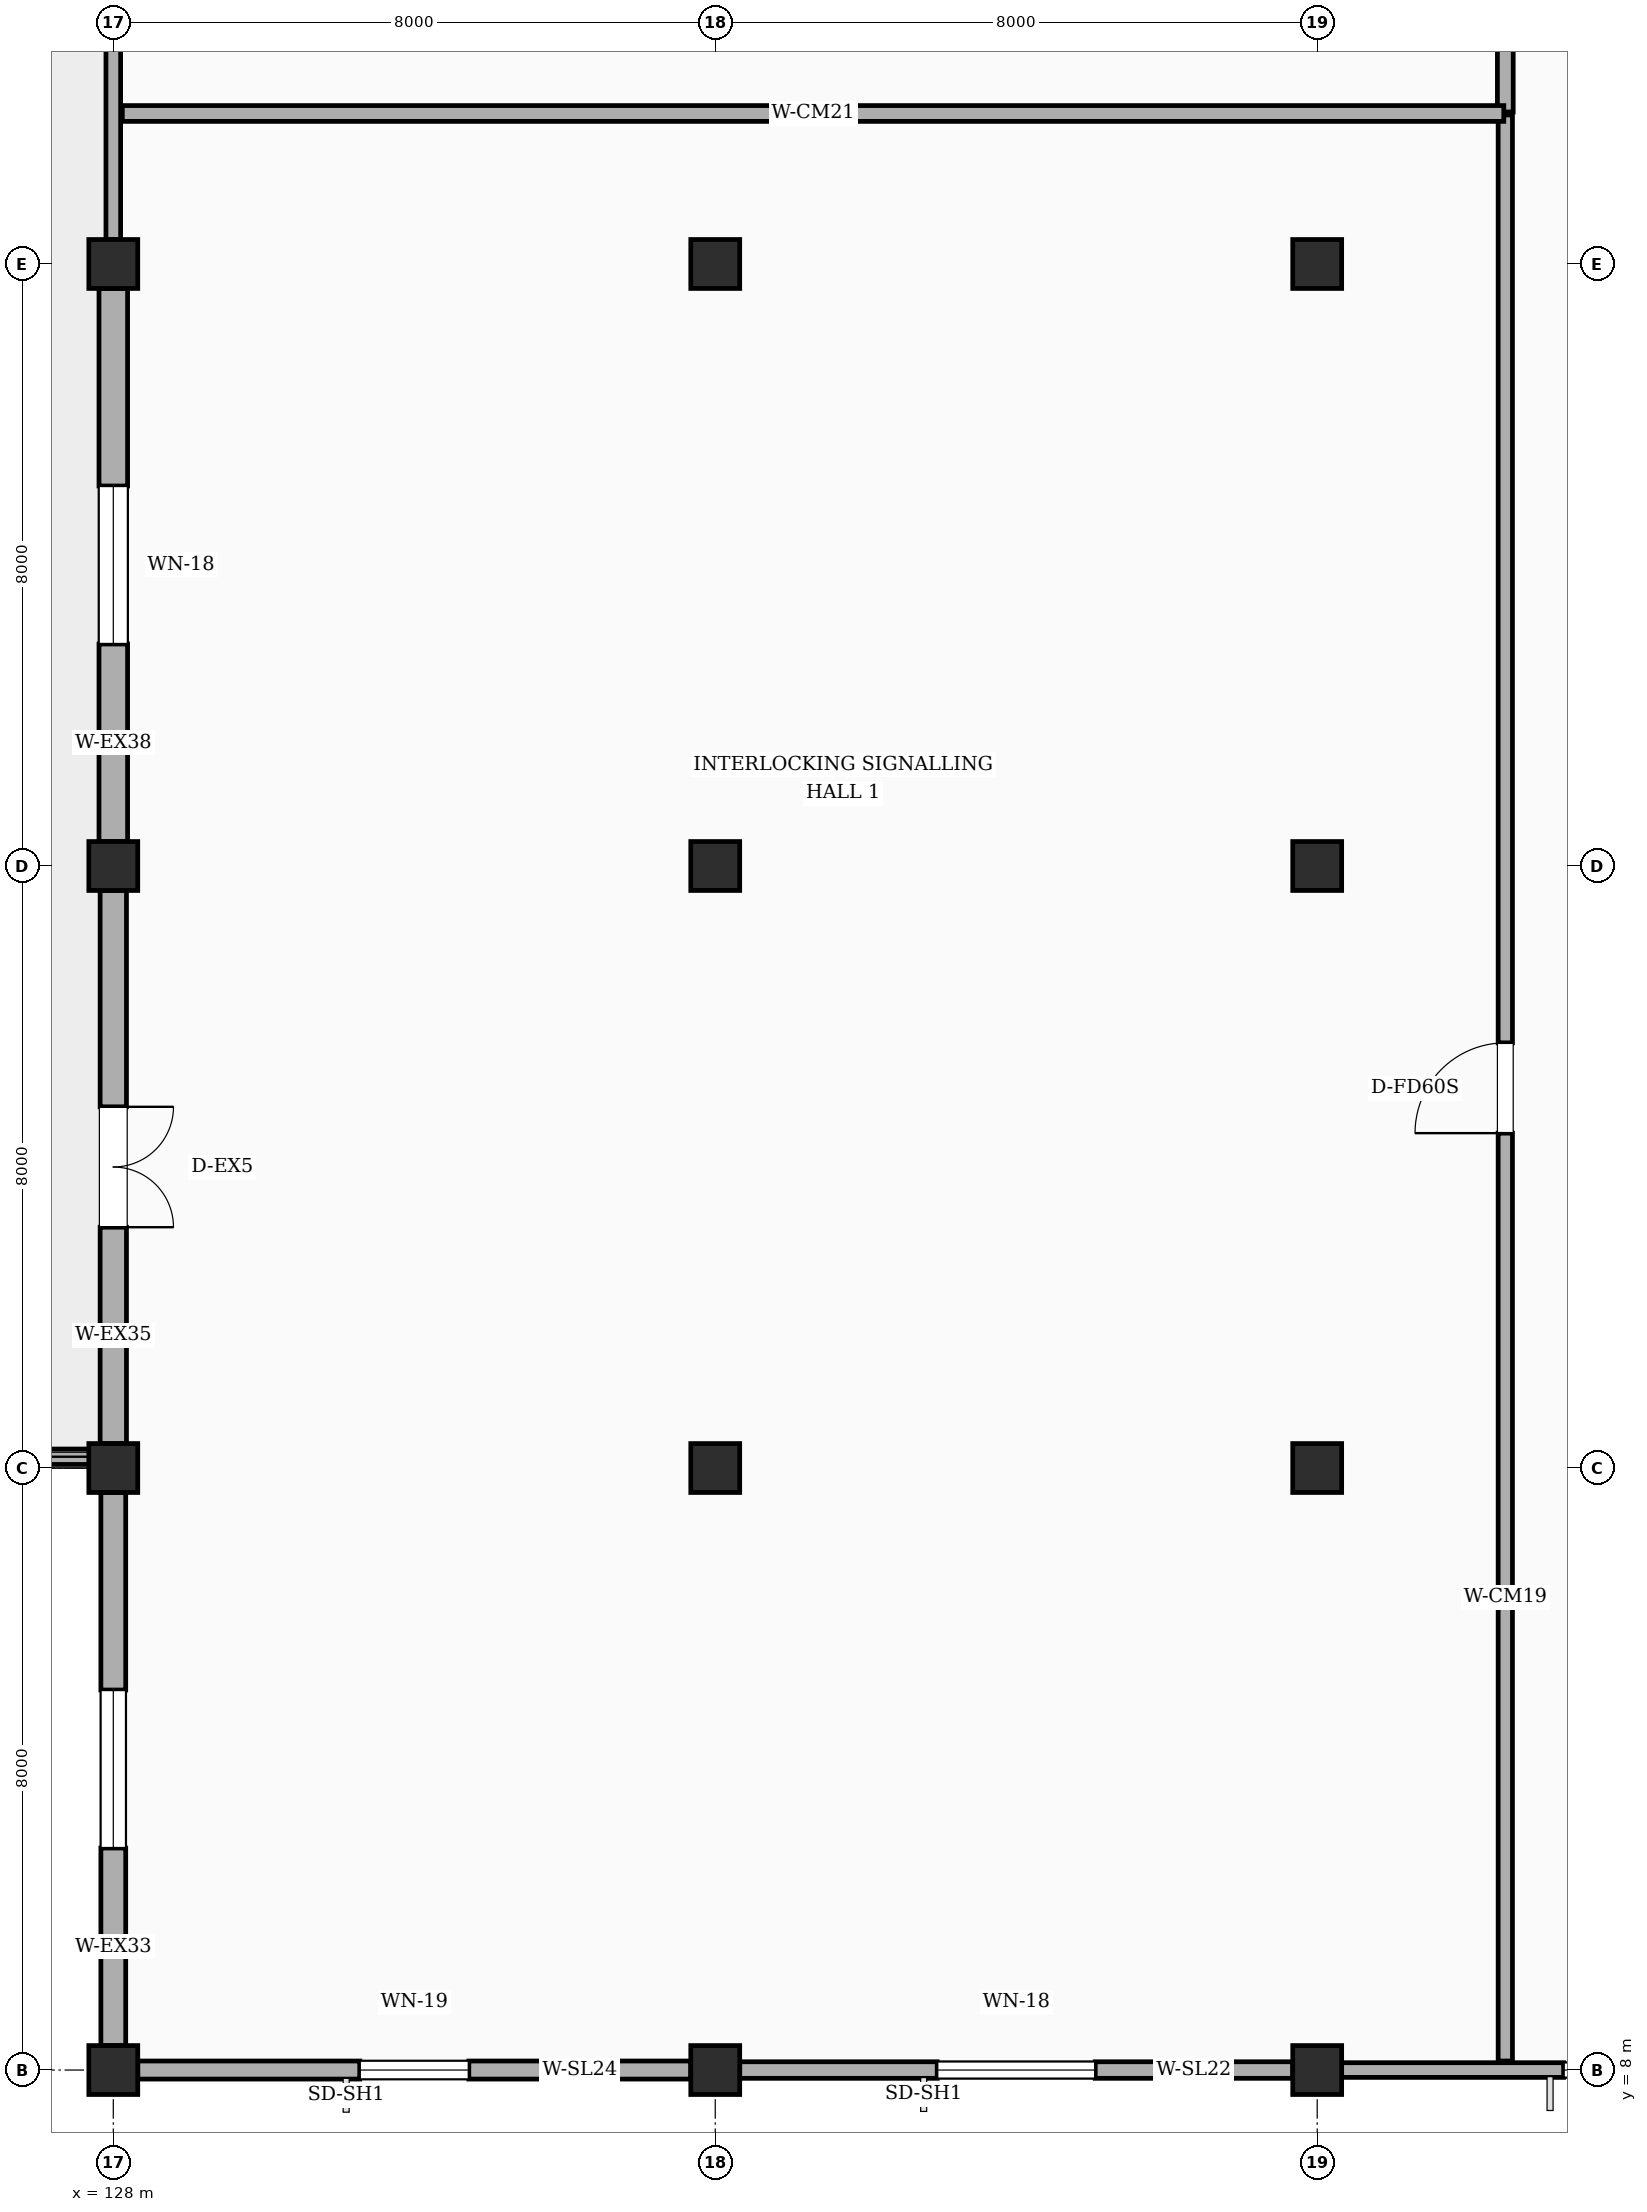
"""IFC4 building model, lengths in metres.
Left out: names, types, materials, properties, quantities, classifications, styles, units other than length and angle.
Written with IfcOpenShell. Run it as: python <this file> out.ifc"""

import sys

from ifc_helpers import new_model, si_unit, direction, frame, frame_2d, origin, origin_2d, place, context, subcontext, project, spatial, rectangle, extrude, element, fill, save


model = new_model("IFC4")
c1 = context("Model", 3, precision=1e-05, world=origin(), true_north=direction((0.0, 1.0)))
c2 = subcontext(c1, "Body", "Model", "MODEL_VIEW")
j1 = project(units=[si_unit("LENGTHUNIT", "METRE"), si_unit("PLANEANGLEUNIT", "RADIAN")], contexts=[c1])
p1 = place(None, origin())
s1 = spatial("IfcSite", under=j1, at=p1, CompositionType="ELEMENT")
p2 = place(p1, origin())
s2 = spatial("IfcBuilding", under=s1, at=p2, CompositionType="ELEMENT")
p3 = place(p2, frame((0.0, 0.0, 15.0)))
s3 = spatial("IfcBuildingStorey", under=s2, at=p3, CompositionType="ELEMENT", Elevation=15.0)
for number, where, z_axis, x_axis in (
    (1, (128.0, 8.0, 0.0), (0.0, 0.0, 1.0), (1.0, 0.0, 0.0)),
    (2, (128.0, 16.0, 0.0), (0.0, 0.0, 1.0), (1.0, 0.0, 0.0)),
    (3, (128.0, 24.0, 0.0), (0.0, 0.0, 1.0), (1.0, 0.0, 0.0)),
    (4, (128.0, 32.0, 0.0), (0.0, 0.0, 1.0), (1.0, 0.0, 0.0)),
    (5, (136.0, 8.0, 0.0), (0.0, 0.0, 1.0), (1.0, 0.0, 0.0)),
    (6, (136.0, 16.0, 0.0), (0.0, 0.0, 1.0), (1.0, 0.0, 0.0)),
    (7, (136.0, 24.0, 0.0), (0.0, 0.0, 1.0), (1.0, 0.0, 0.0)),
    (8, (136.0, 32.0, 0.0), (0.0, 0.0, 1.0), (1.0, 0.0, 0.0)),
    (9, (144.0, 8.0, 0.0), (0.0, 0.0, 1.0), (1.0, 0.0, 0.0)),
    (10, (144.0, 16.0, 0.0), (0.0, 0.0, 1.0), (1.0, 0.0, 0.0)),
    (11, (144.0, 24.0, 0.0), (0.0, 0.0, 1.0), (1.0, 0.0, 0.0)),
    (12, (144.0, 32.0, 0.0), (0.0, 0.0, 1.0), (1.0, 0.0, 0.0)),
):
    element("IfcColumn", number, at=place(p3, frame(where, z_axis=z_axis, x_axis=x_axis)), inside=s3, PredefinedType="COLUMN", context=c2, shape_type="SweptSolid", body=[
        extrude(rectangle(XDim=0.65, YDim=0.65, at=origin_2d()), origin(), (0.0, 0.0, 1.0), 4.2),
    ])
p4 = place(p3, frame((128.325, 8.0, 0.0), z_axis=(0.0, 0.0, 1.0), x_axis=(1.0, 0.0, 0.0)))
e13 = element("IfcWall", 13, at=p4, inside=s3, PredefinedType="SOLIDWALL", context=c2, shape_type="SweptSolid", body=[
    extrude(rectangle(XDim=7.35, YDim=0.24, at=frame_2d((3.675, 0.0))), origin(), (0.0, 0.0, 1.0), 3.442),
])
p5 = place(p4, frame((2.95, 0.0, 1.15)))
e14 = element("IfcOpeningElement", 14, at=p5, cuts=e13, PredefinedType="OPENING", context=c2, shape_type="SweptSolid", body=[
    extrude(rectangle(XDim=1.45, YDim=1.4, at=frame_2d((0.725, 0.7))), frame((0.0, 0.13, 0.0), z_axis=(0.0, -1.0, 0.0), x_axis=(1.0, 0.0, 0.0)), (0.0, 0.0, 1.0), 0.26),
])
p6 = place(p3, frame((136.325, 8.0, 0.0), z_axis=(0.0, 0.0, 1.0), x_axis=(1.0, 0.0, 0.0)))
e15 = element("IfcWall", 15, at=p6, inside=s3, PredefinedType="SOLIDWALL", context=c2, shape_type="SweptSolid", body=[
    extrude(rectangle(XDim=7.35, YDim=0.22, at=frame_2d((3.675, 0.0))), origin(), (0.0, 0.0, 1.0), 3.365),
])
p7 = place(p6, frame((2.625, 0.0, 1.15)))
e16 = element("IfcOpeningElement", 16, at=p7, cuts=e15, PredefinedType="OPENING", context=c2, shape_type="SweptSolid", body=[
    extrude(rectangle(XDim=2.1, YDim=1.4, at=frame_2d((1.05, 0.7))), frame((0.0, 0.12, 0.0), z_axis=(0.0, -1.0, 0.0), x_axis=(1.0, 0.0, 0.0)), (0.0, 0.0, 1.0), 0.24),
])
p8 = place(p3, frame((144.325, 8.0, 0.0), z_axis=(0.0, 0.0, 1.0), x_axis=(1.0, 0.0, 0.0)))
e17 = element("IfcWall", 17, at=p8, inside=s3, PredefinedType="SOLIDWALL", context=c2, shape_type="SweptSolid", body=[
    extrude(rectangle(XDim=7.35, YDim=0.195, at=frame_2d((3.675, 0.0))), origin(), (0.0, 0.0, 1.0), 3.95),
])
p9 = place(p8, frame((2.95, 0.0, 1.15)))
e18 = element("IfcOpeningElement", 18, at=p9, cuts=e17, PredefinedType="OPENING", context=c2, shape_type="SweptSolid", body=[
    extrude(rectangle(XDim=1.45, YDim=1.4, at=frame_2d((0.725, 0.7))), frame((0.0, 0.107, 0.0), z_axis=(0.0, -1.0, 0.0), x_axis=(1.0, 0.0, 0.0)), (0.0, 0.0, 1.0), 0.215),
])
p10 = place(p3, frame((128.0, 39.675, 0.0), z_axis=(0.0, 0.0, 1.0), x_axis=(0.0, -1.0, 0.0)))
e19 = element("IfcWall", 19, at=p10, inside=s3, PredefinedType="SOLIDWALL", context=c2, shape_type="SweptSolid", body=[
    extrude(rectangle(XDim=7.35, YDim=0.195, at=frame_2d((3.675, 0.0))), origin(), (0.0, 0.0, 1.0), 3.36),
])
p11 = place(p10, frame((2.95, 0.0, 1.15)))
e20 = element("IfcOpeningElement", 20, at=p11, cuts=e19, PredefinedType="OPENING", context=c2, shape_type="SweptSolid", body=[
    extrude(rectangle(XDim=1.45, YDim=1.4, at=frame_2d((0.725, 0.7))), frame((0.0, 0.107, 0.0), z_axis=(0.0, -1.0, 0.0), x_axis=(1.0, 0.0, 0.0)), (0.0, 0.0, 1.0), 0.215),
])
p12 = place(p3, frame((128.0, 31.675, 0.0), z_axis=(0.0, 0.0, 1.0), x_axis=(0.0, -1.0, 0.0)))
e21 = element("IfcWall", 21, at=p12, inside=s3, PredefinedType="STANDARD", context=c2, shape_type="SweptSolid", body=[
    extrude(rectangle(XDim=7.35, YDim=0.38, at=frame_2d((3.675, 0.0))), origin(), (0.0, 0.0, 1.0), 3.36),
])
p13 = place(p12, frame((2.625, 0.0, 1.15)))
e22 = element("IfcOpeningElement", 22, at=p13, cuts=e21, PredefinedType="OPENING", context=c2, shape_type="SweptSolid", body=[
    extrude(rectangle(XDim=2.1, YDim=1.4, at=frame_2d((1.05, 0.7))), frame((0.0, 0.2, 0.0), z_axis=(0.0, -1.0, 0.0), x_axis=(1.0, 0.0, 0.0)), (0.0, 0.0, 1.0), 0.4),
])
p14 = place(p3, frame((128.0, 23.675, 0.0), z_axis=(0.0, 0.0, 1.0), x_axis=(0.0, -1.0, 0.0)))
e23 = element("IfcWall", 23, at=p14, inside=s3, PredefinedType="STANDARD", context=c2, shape_type="SweptSolid", body=[
    extrude(rectangle(XDim=7.35, YDim=0.35, at=frame_2d((3.675, 0.0))), origin(), (0.0, 0.0, 1.0), 3.36),
])
p15 = place(p14, frame((2.875, 0.0, 0.0)))
e24 = element("IfcOpeningElement", 24, at=p15, cuts=e23, PredefinedType="OPENING", context=c2, shape_type="SweptSolid", body=[
    extrude(rectangle(XDim=1.6, YDim=2.3, at=frame_2d((0.8, 1.15))), frame((0.0, 0.185, 0.0), z_axis=(0.0, -1.0, 0.0), x_axis=(1.0, 0.0, 0.0)), (0.0, 0.0, 1.0), 0.37),
])
p16 = place(p3, frame((128.0, 15.675, 0.0), z_axis=(0.0, 0.0, 1.0), x_axis=(0.0, -1.0, 0.0)))
e25 = element("IfcWall", 25, at=p16, inside=s3, PredefinedType="STANDARD", context=c2, shape_type="SweptSolid", body=[
    extrude(rectangle(XDim=7.35, YDim=0.33, at=frame_2d((3.675, 0.0))), origin(), (0.0, 0.0, 1.0), 3.36),
])
p17 = place(p16, frame((2.625, 0.0, 1.15)))
e26 = element("IfcOpeningElement", 26, at=p17, cuts=e25, PredefinedType="OPENING", context=c2, shape_type="SweptSolid", body=[
    extrude(rectangle(XDim=2.1, YDim=1.4, at=frame_2d((1.05, 0.7))), frame((0.0, 0.175, 0.0), z_axis=(0.0, -1.0, 0.0), x_axis=(1.0, 0.0, 0.0)), (0.0, 0.0, 1.0), 0.35),
])
p18 = place(p3, frame((121.11, 16.15, 0.0), z_axis=(0.0, 0.0, 1.0), x_axis=(1.0, 0.0, 0.0)))
e27 = element("IfcWall", 27, at=p18, inside=s3, PredefinedType="PARAPET", context=c2, shape_type="SweptSolid", body=[
    extrude(rectangle(XDim=6.58, YDim=0.205, at=frame_2d((3.29, 0.0))), origin(), (0.0, 0.0, 1.0), 0.42),
])
p19 = place(p3, frame((146.5, 8.12, 0.0), z_axis=(0.0, 0.0, 1.0), x_axis=(0.0, 1.0, 0.0)))
e28 = element("IfcWall", 28, at=p19, inside=s3, PredefinedType="SOLIDWALL", context=c2, shape_type="SweptSolid", body=[
    extrude(rectangle(XDim=25.86, YDim=0.19, at=frame_2d((12.93, 0.0))), origin(), (0.0, 0.0, 1.0), 3.95),
])
p20 = place(p19, frame((12.33, 0.0, 0.0)))
e29 = element("IfcOpeningElement", 29, at=p20, cuts=e28, PredefinedType="OPENING", context=c2, shape_type="SweptSolid", body=[
    extrude(rectangle(XDim=1.2, YDim=2.15, at=frame_2d((0.6, 1.075))), frame((0.0, 0.105, 0.0), z_axis=(0.0, -1.0, 0.0), x_axis=(1.0, 0.0, 0.0)), (0.0, 0.0, 1.0), 0.21),
])
p21 = place(p3, frame((146.5, 34.02, 0.0), z_axis=(0.0, 0.0, 1.0), x_axis=(0.0, 1.0, 0.0)))
e30 = element("IfcWall", 30, at=p21, inside=s3, PredefinedType="SOLIDWALL", context=c2, shape_type="SweptSolid", body=[
    extrude(rectangle(XDim=17.96, YDim=0.21, at=frame_2d((8.98, 0.0))), origin(), (0.0, 0.0, 1.0), 3.95),
])
p22 = place(p21, frame((8.38, 0.0, 0.0)))
e31 = element("IfcOpeningElement", 31, at=p22, cuts=e30, PredefinedType="OPENING", context=c2, shape_type="SweptSolid", body=[
    extrude(rectangle(XDim=1.2, YDim=2.15, at=frame_2d((0.6, 1.075))), frame((0.0, 0.115, 0.0), z_axis=(0.0, -1.0, 0.0), x_axis=(1.0, 0.0, 0.0)), (0.0, 0.0, 1.0), 0.23),
])
p23 = place(p3, frame((128.12, 34.0, 0.0), z_axis=(0.0, 0.0, 1.0), x_axis=(1.0, 0.0, 0.0)))
e32 = element("IfcWall", 32, at=p23, inside=s3, PredefinedType="SOLIDWALL", context=c2, shape_type="SweptSolid", body=[
    extrude(rectangle(XDim=18.36, YDim=0.21, at=frame_2d((9.18, 0.0))), origin(), (0.0, 0.0, 1.0), 3.31),
])
p24 = place(p5, origin())
e33 = element("IfcWindow", 33, at=p24, inside=s3, PartitioningType="SINGLE_PANEL", PredefinedType="WINDOW", context=c2, shape_type="SweptSolid", body=[
    extrude(rectangle(XDim=1.45, YDim=1.4, at=frame_2d((0.725, 0.7))), frame((0.0, 0.03, 0.0), z_axis=(0.0, -1.0, 0.0), x_axis=(1.0, 0.0, 0.0)), (0.0, 0.0, 1.0), 0.06),
])
fill(e14, e33)
p25 = place(p7, origin())
e34 = element("IfcWindow", 34, at=p25, inside=s3, PartitioningType="SINGLE_PANEL", PredefinedType="WINDOW", context=c2, shape_type="SweptSolid", body=[
    extrude(rectangle(XDim=2.1, YDim=1.4, at=frame_2d((1.05, 0.7))), frame((0.0, 0.03, 0.0), z_axis=(0.0, -1.0, 0.0), x_axis=(1.0, 0.0, 0.0)), (0.0, 0.0, 1.0), 0.06),
])
fill(e16, e34)
p26 = place(p9, origin())
e35 = element("IfcWindow", 35, at=p26, inside=s3, PartitioningType="SINGLE_PANEL", PredefinedType="WINDOW", context=c2, shape_type="SweptSolid", body=[
    extrude(rectangle(XDim=1.45, YDim=1.4, at=frame_2d((0.725, 0.7))), frame((0.0, 0.03, 0.0), z_axis=(0.0, -1.0, 0.0), x_axis=(1.0, 0.0, 0.0)), (0.0, 0.0, 1.0), 0.06),
])
fill(e18, e35)
p27 = place(p13, origin())
e36 = element("IfcWindow", 36, at=p27, inside=s3, PartitioningType="SINGLE_PANEL", PredefinedType="WINDOW", context=c2, shape_type="SweptSolid", body=[
    extrude(rectangle(XDim=2.1, YDim=1.4, at=frame_2d((1.05, 0.7))), frame((0.0, 0.03, 0.0), z_axis=(0.0, -1.0, 0.0), x_axis=(1.0, 0.0, 0.0)), (0.0, 0.0, 1.0), 0.06),
])
fill(e22, e36)
p28 = place(p15, origin())
e37 = element("IfcDoor", 37, at=p28, inside=s3, OperationType="DOUBLE_DOOR_SINGLE_SWING", PredefinedType="DOOR", context=c2, shape_type="SweptSolid", body=[
    extrude(rectangle(XDim=1.6, YDim=2.3, at=frame_2d((0.8, 1.15))), frame((0.0, 0.025, 0.0), z_axis=(0.0, -1.0, 0.0), x_axis=(1.0, 0.0, 0.0)), (0.0, 0.0, 1.0), 0.05),
])
fill(e24, e37)
p29 = place(p17, origin())
e38 = element("IfcWindow", 38, at=p29, inside=s3, PartitioningType="SINGLE_PANEL", PredefinedType="WINDOW", context=c2, shape_type="SweptSolid", body=[
    extrude(rectangle(XDim=2.1, YDim=1.4, at=frame_2d((1.05, 0.7))), frame((0.0, 0.03, 0.0), z_axis=(0.0, -1.0, 0.0), x_axis=(1.0, 0.0, 0.0)), (0.0, 0.0, 1.0), 0.06),
])
fill(e26, e38)
p30 = place(p20, origin())
e39 = element("IfcDoor", 39, at=p30, inside=s3, OperationType="SINGLE_SWING_LEFT", PredefinedType="DOOR", context=c2, shape_type="SweptSolid", body=[
    extrude(rectangle(XDim=1.2, YDim=2.15, at=frame_2d((0.6, 1.075))), frame((0.0, 0.025, 0.0), z_axis=(0.0, -1.0, 0.0), x_axis=(1.0, 0.0, 0.0)), (0.0, 0.0, 1.0), 0.05),
])
fill(e29, e39)
save(model, sys.argv[1])
